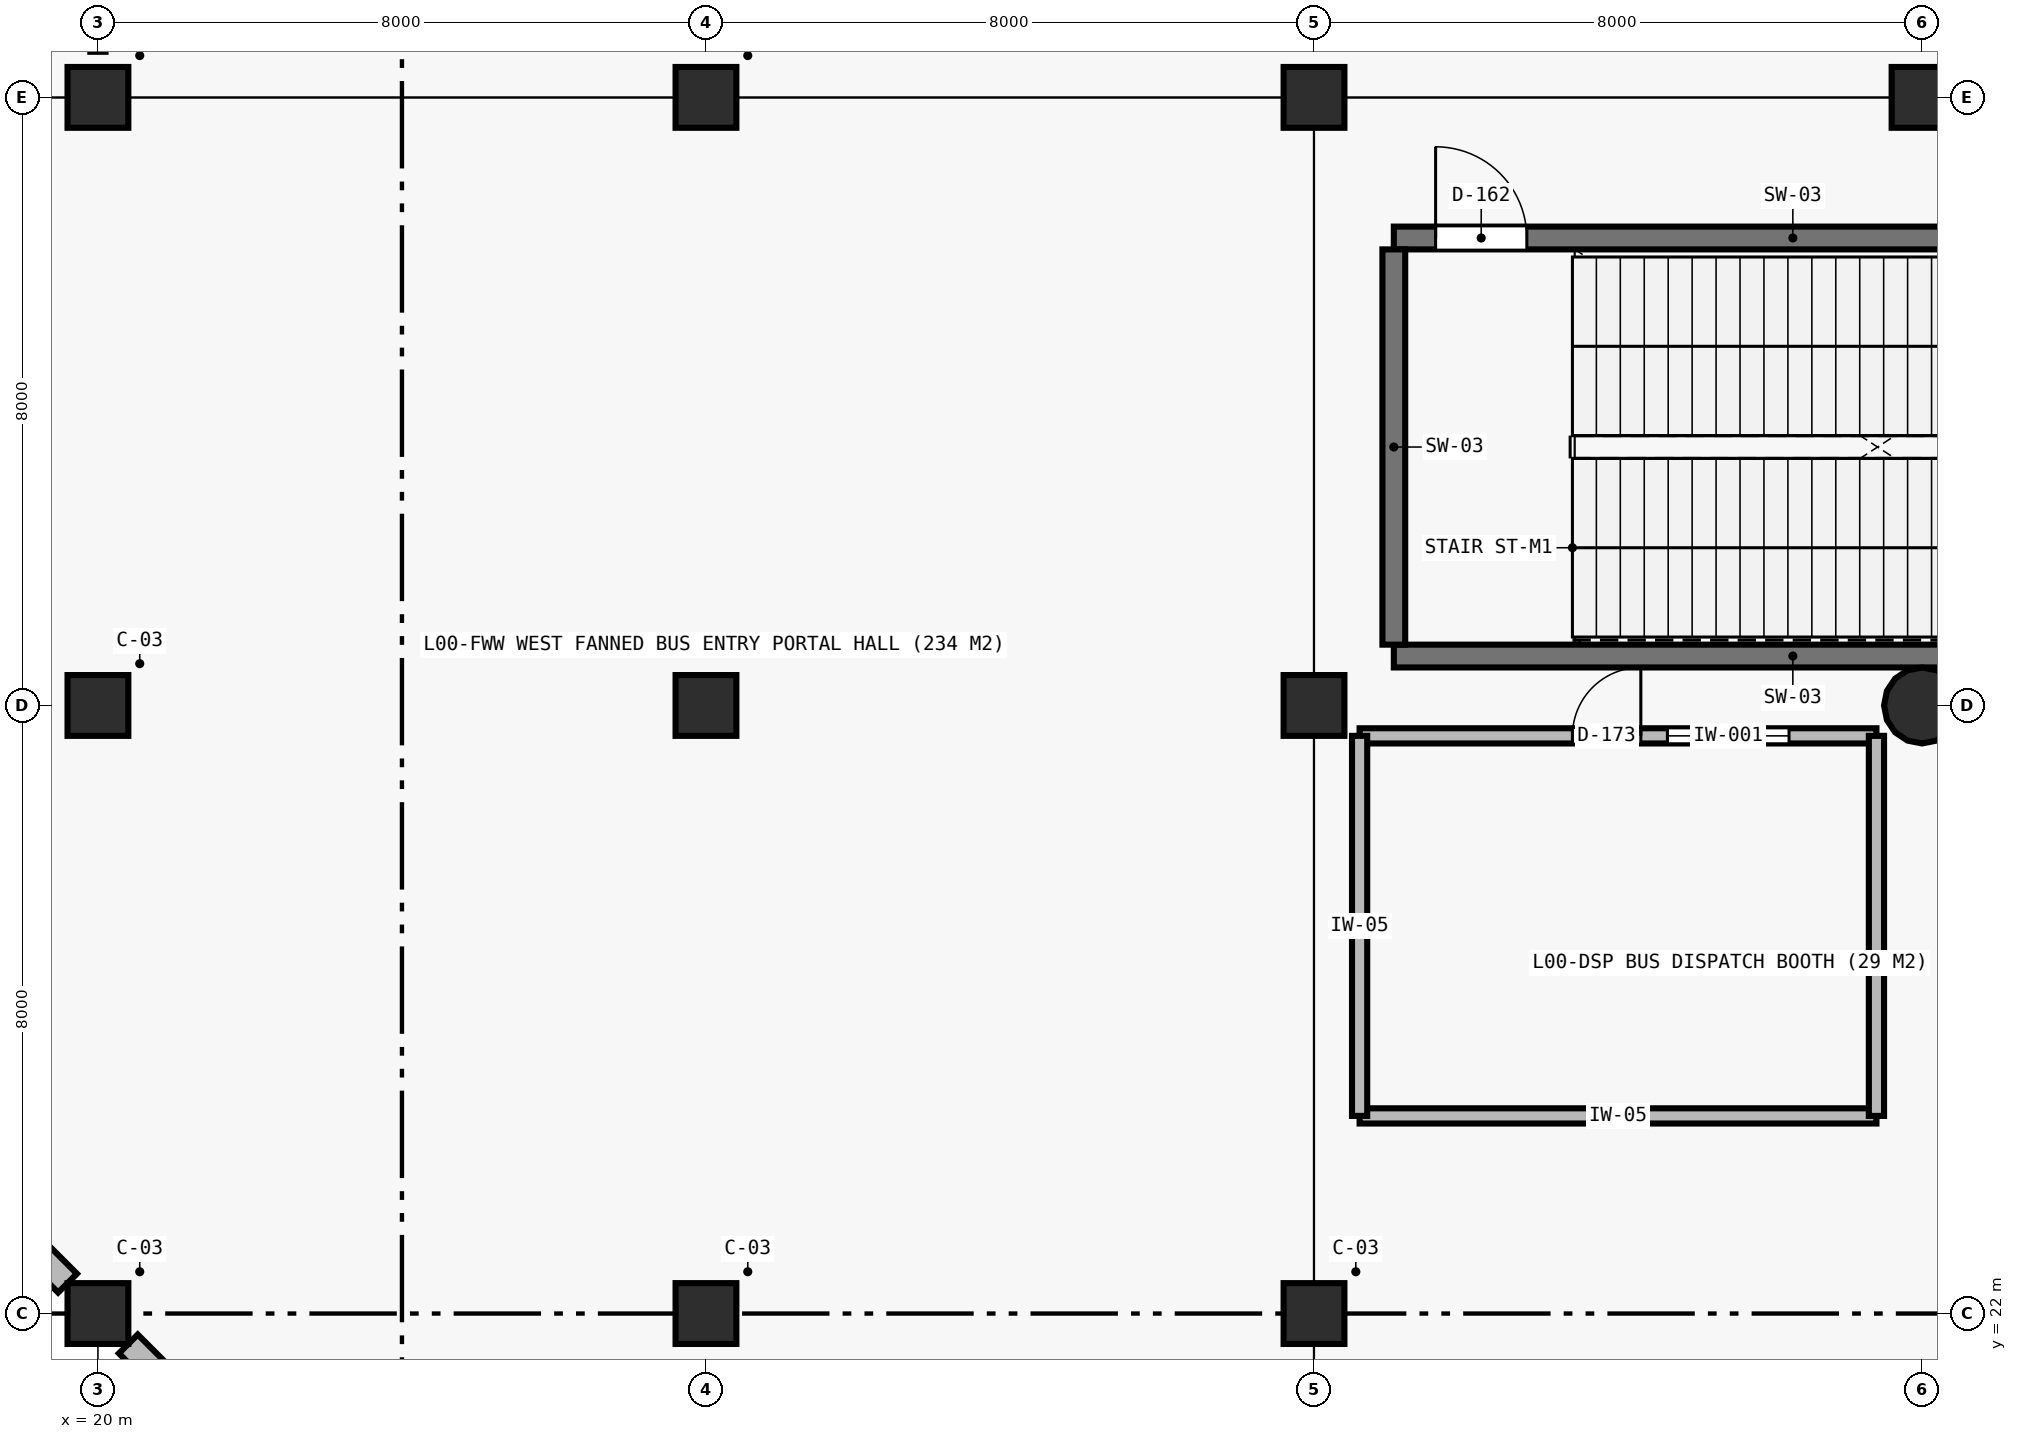
"""IFC4 building model, lengths in metres.
Left out: names, types, materials, properties, quantities, classifications, styles, units other than length and angle.
Written with IfcOpenShell. Run it as: python <this file> out.ifc"""

import sys

from ifc_helpers import new_model, si_unit, direction, frame, frame_2d, origin, origin_2d, place, context, subcontext, project, spatial, rectangle, circle, extrude, element, fill, save


model = new_model("IFC4")
c1 = context("Model", 3, precision=1e-05, world=origin(), true_north=direction((0.0, 1.0)))
c2 = subcontext(c1, "Body", "Model", "MODEL_VIEW")
j1 = project(units=[si_unit("LENGTHUNIT", "METRE"), si_unit("PLANEANGLEUNIT", "RADIAN")], contexts=[c1])
p1 = place(None, origin())
s1 = spatial("IfcSite", under=j1, at=p1, CompositionType="ELEMENT")
p2 = place(p1, origin())
s2 = spatial("IfcBuilding", under=s1, at=p2, CompositionType="ELEMENT")
p3 = place(p2, origin())
s3 = spatial("IfcBuildingStorey", under=s2, at=p3, CompositionType="ELEMENT", Elevation=0.0)
for number, where, z_axis, x_axis in (
    (1, (20.0, 22.0, 0.0), (0.0, 0.0, 1.0), (1.0, 0.0, 0.0)),
    (2, (20.0, 30.0, 0.0), (0.0, 0.0, 1.0), (1.0, 0.0, 0.0)),
):
    element("IfcColumn", number, at=place(p3, frame(where, z_axis=z_axis, x_axis=x_axis)), inside=s3, PredefinedType="COLUMN", context=c2, shape_type="SweptSolid", body=[
        extrude(rectangle(XDim=0.8, YDim=0.8, at=origin_2d()), origin(), (0.0, 0.0, 1.0), 6.6),
    ])
p4 = place(p3, frame((20.0, 38.0, 0.0), z_axis=(0.0, 0.0, 1.0), x_axis=(1.0, 0.0, 0.0)))
e3 = element("IfcColumn", 3, at=p4, inside=s3, PredefinedType="COLUMN", context=c2, shape_type="SweptSolid", body=[
    extrude(rectangle(XDim=0.8, YDim=0.8, at=origin_2d()), origin(), (0.0, 0.0, 1.0), 6.02),
])
for number, where, z_axis, x_axis in (
    (4, (28.0, 22.0, 0.0), (0.0, 0.0, 1.0), (1.0, 0.0, 0.0)),
    (5, (28.0, 30.0, 0.0), (0.0, 0.0, 1.0), (1.0, 0.0, 0.0)),
):
    element("IfcColumn", number, at=place(p3, frame(where, z_axis=z_axis, x_axis=x_axis)), inside=s3, PredefinedType="COLUMN", context=c2, shape_type="SweptSolid", body=[
        extrude(rectangle(XDim=0.8, YDim=0.8, at=origin_2d()), origin(), (0.0, 0.0, 1.0), 6.6),
    ])
p5 = place(p3, frame((28.0, 38.0, 0.0), z_axis=(0.0, 0.0, 1.0), x_axis=(1.0, 0.0, 0.0)))
e6 = element("IfcColumn", 6, at=p5, inside=s3, PredefinedType="COLUMN", context=c2, shape_type="SweptSolid", body=[
    extrude(rectangle(XDim=0.8, YDim=0.8, at=origin_2d()), origin(), (0.0, 0.0, 1.0), 6.02),
])
p6 = place(p3, frame((36.0, 22.0, 0.0), z_axis=(0.0, 0.0, 1.0), x_axis=(1.0, 0.0, 0.0)))
e7 = element("IfcColumn", 7, at=p6, inside=s3, PredefinedType="COLUMN", context=c2, shape_type="SweptSolid", body=[
    extrude(rectangle(XDim=0.8, YDim=0.8, at=origin_2d()), origin(), (0.0, 0.0, 1.0), 6.6),
])
for number, where, z_axis, x_axis in (
    (8, (36.0, 30.0, 0.0), (0.0, 0.0, 1.0), (1.0, 0.0, 0.0)),
    (9, (36.0, 38.0, 0.0), (0.0, 0.0, 1.0), (1.0, 0.0, 0.0)),
):
    element("IfcColumn", number, at=place(p3, frame(where, z_axis=z_axis, x_axis=x_axis)), inside=s3, PredefinedType="COLUMN", context=c2, shape_type="SweptSolid", body=[
        extrude(rectangle(XDim=0.8, YDim=0.8, at=origin_2d()), origin(), (0.0, 0.0, 1.0), 6.02),
    ])
p7 = place(p3, frame((44.0, 30.0, 0.0), z_axis=(0.0, 0.0, 1.0), x_axis=(1.0, 0.0, 0.0)))
e10 = element("IfcColumn", 10, at=p7, inside=s3, PredefinedType="COLUMN", context=c2, shape_type="SweptSolid", body=[
    extrude(circle(Radius=0.5, at=origin_2d()), origin(), (0.0, 0.0, 1.0), 6.02),
])
p8 = place(p3, frame((44.0, 38.0, 0.0), z_axis=(0.0, 0.0, 1.0), x_axis=(1.0, 0.0, 0.0)))
e11 = element("IfcColumn", 11, at=p8, inside=s3, PredefinedType="COLUMN", context=c2, shape_type="SweptSolid", body=[
    extrude(rectangle(XDim=0.8, YDim=0.8, at=origin_2d()), origin(), (0.0, 0.0, 1.0), 6.02),
])
p9 = place(p3, frame((37.05, 36.15, 0.0), z_axis=(0.0, 0.0, 1.0), x_axis=(1.0, 0.0, 0.0)))
e12 = element("IfcWall", 12, at=p9, inside=s3, PredefinedType="SHEAR", context=c2, shape_type="SweptSolid", body=[
    extrude(rectangle(XDim=10.5, YDim=0.3, at=frame_2d((5.25, 0.0))), origin(), (0.0, 0.0, 1.0), 6.02),
])
p10 = place(p9, frame((0.55, 0.0, 0.0)))
e13 = element("IfcOpeningElement", 13, at=p10, cuts=e12, PredefinedType="OPENING", context=c2, shape_type="SweptSolid", body=[
    extrude(rectangle(XDim=1.2, YDim=2.2, at=frame_2d((0.6, 1.1))), frame((0.0, 0.16, 0.0), z_axis=(0.0, -1.0, 0.0), x_axis=(1.0, 0.0, 0.0)), (0.0, 0.0, 1.0), 0.32),
])
p11 = place(p3, frame((37.05, 30.65, 0.0), z_axis=(0.0, 0.0, 1.0), x_axis=(1.0, 0.0, 0.0)))
e14 = element("IfcWall", 14, at=p11, inside=s3, PredefinedType="SHEAR", context=c2, shape_type="SweptSolid", body=[
    extrude(rectangle(XDim=10.5, YDim=0.3, at=frame_2d((5.25, 0.0))), origin(), (0.0, 0.0, 1.0), 6.02),
])
p12 = place(p3, frame((37.05, 30.8, 0.0), z_axis=(0.0, 0.0, 1.0), x_axis=(0.0, 1.0, 0.0)))
e15 = element("IfcWall", 15, at=p12, inside=s3, PredefinedType="SHEAR", context=c2, shape_type="SweptSolid", body=[
    extrude(rectangle(XDim=5.2, YDim=0.3, at=frame_2d((2.6, 0.0))), origin(), (0.0, 0.0, 1.0), 6.02),
])
p13 = place(p3, frame((27.6, 14.4, 0.0), z_axis=(0.0, 0.0, 1.0), x_axis=(-0.707106781187, 0.707106781187, 0.0)))
e16 = element("IfcWall", 16, at=p13, inside=s3, PredefinedType="STANDARD", context=c2, shape_type="SweptSolid", body=[
    extrude(rectangle(XDim=10.183, YDim=0.35, at=frame_2d((5.091, 0.0))), origin(), (0.0, 0.0, 1.0), 5.6),
])
p14 = place(p13, frame((2.791, 0.0, 0.0)))
e17 = element("IfcOpeningElement", 17, at=p14, cuts=e16, PredefinedType="OPENING", context=c2, shape_type="SweptSolid", body=[
    extrude(rectangle(XDim=4.6, YDim=4.4, at=frame_2d((2.3, 2.2))), frame((0.0, 0.185, 0.0), z_axis=(0.0, -1.0, 0.0), x_axis=(1.0, 0.0, 0.0)), (0.0, 0.0, 1.0), 0.37),
])
p15 = place(p3, frame((19.6, 22.4, 0.0), z_axis=(0.0, 0.0, 1.0), x_axis=(-0.707106781187, 0.707106781187, 0.0)))
e18 = element("IfcWall", 18, at=p15, inside=s3, PredefinedType="STANDARD", context=c2, shape_type="SweptSolid", body=[
    extrude(rectangle(XDim=10.183, YDim=0.35, at=frame_2d((5.091, 0.0))), origin(), (0.0, 0.0, 1.0), 5.6),
])
p16 = place(p15, frame((2.791, 0.0, 0.0)))
e19 = element("IfcOpeningElement", 19, at=p16, cuts=e18, PredefinedType="OPENING", context=c2, shape_type="SweptSolid", body=[
    extrude(rectangle(XDim=4.6, YDim=4.4, at=frame_2d((2.3, 2.2))), frame((0.0, 0.185, 0.0), z_axis=(0.0, -1.0, 0.0), x_axis=(1.0, 0.0, 0.0)), (0.0, 0.0, 1.0), 0.37),
])
p17 = place(p3, frame((36.6, 29.6, 0.0), z_axis=(0.0, 0.0, 1.0), x_axis=(1.0, 0.0, 0.0)))
e20 = element("IfcWall", 20, at=p17, inside=s3, PredefinedType="SOLIDWALL", context=c2, shape_type="SweptSolid", body=[
    extrude(rectangle(XDim=6.8, YDim=0.2, at=frame_2d((3.4, 0.0))), origin(), (0.0, 0.0, 1.0), 5.65),
])
p18 = place(p17, frame((2.8, 0.0, 0.0)))
e21 = element("IfcOpeningElement", 21, at=p18, cuts=e20, PredefinedType="OPENING", context=c2, shape_type="SweptSolid", body=[
    extrude(rectangle(XDim=0.9, YDim=2.1, at=frame_2d((0.45, 1.05))), frame((0.0, 0.11, 0.0), z_axis=(0.0, -1.0, 0.0), x_axis=(1.0, 0.0, 0.0)), (0.0, 0.0, 1.0), 0.22),
])
p19 = place(p17, frame((4.05, 0.0, 0.95)))
e22 = element("IfcOpeningElement", 22, at=p19, cuts=e20, PredefinedType="OPENING", context=c2, shape_type="SweptSolid", body=[
    extrude(rectangle(XDim=1.6, YDim=1.3, at=frame_2d((0.8, 0.65))), frame((0.0, 0.11, 0.0), z_axis=(0.0, -1.0, 0.0), x_axis=(1.0, 0.0, 0.0)), (0.0, 0.0, 1.0), 0.22),
])
p20 = place(p3, frame((36.6, 24.6, 0.0), z_axis=(0.0, 0.0, 1.0), x_axis=(1.0, 0.0, 0.0)))
e23 = element("IfcWall", 23, at=p20, inside=s3, PredefinedType="SOLIDWALL", context=c2, shape_type="SweptSolid", body=[
    extrude(rectangle(XDim=6.8, YDim=0.2, at=frame_2d((3.4, 0.0))), origin(), (0.0, 0.0, 1.0), 5.65),
])
for number, where, z_axis, x_axis in (
    (24, (36.6, 24.6, 0.0), (0.0, 0.0, 1.0), (0.0, 1.0, 0.0)),
    (25, (43.4, 24.6, 0.0), (0.0, 0.0, 1.0), (0.0, 1.0, 0.0)),
):
    element("IfcWall", number, at=place(p3, frame(where, z_axis=z_axis, x_axis=x_axis)), inside=s3, PredefinedType="SOLIDWALL", context=c2, shape_type="SweptSolid", body=[
        extrude(rectangle(XDim=5.0, YDim=0.2, at=frame_2d((2.5, 0.0))), origin(), (0.0, 0.0, 1.0), 5.65),
    ])
p21 = place(p10, origin())
e26 = element("IfcDoor", 26, at=p21, inside=s3, OperationType="SINGLE_SWING_LEFT", PredefinedType="DOOR", context=c2, shape_type="SweptSolid", body=[
    extrude(rectangle(XDim=1.2, YDim=2.2, at=frame_2d((0.6, 1.1))), frame((0.0, 0.025, 0.0), z_axis=(0.0, -1.0, 0.0), x_axis=(1.0, 0.0, 0.0)), (0.0, 0.0, 1.0), 0.05),
])
fill(e13, e26)
p22 = place(p18, origin())
e27 = element("IfcDoor", 27, at=p22, inside=s3, OperationType="SINGLE_SWING_RIGHT", PredefinedType="DOOR", context=c2, shape_type="SweptSolid", body=[
    extrude(rectangle(XDim=0.9, YDim=2.1, at=frame_2d((0.45, 1.05))), frame((0.0, 0.025, 0.0), z_axis=(0.0, -1.0, 0.0), x_axis=(1.0, 0.0, 0.0)), (0.0, 0.0, 1.0), 0.05),
])
fill(e21, e27)
p23 = place(p19, origin())
e28 = element("IfcWindow", 28, at=p23, inside=s3, PartitioningType="SINGLE_PANEL", PredefinedType="WINDOW", context=c2, shape_type="SweptSolid", body=[
    extrude(rectangle(XDim=1.6, YDim=1.3, at=frame_2d((0.8, 0.65))), frame((0.0, 0.03, 0.0), z_axis=(0.0, -1.0, 0.0), x_axis=(1.0, 0.0, 0.0)), (0.0, 0.0, 1.0), 0.06),
])
fill(e22, e28)
save(model, sys.argv[1])
